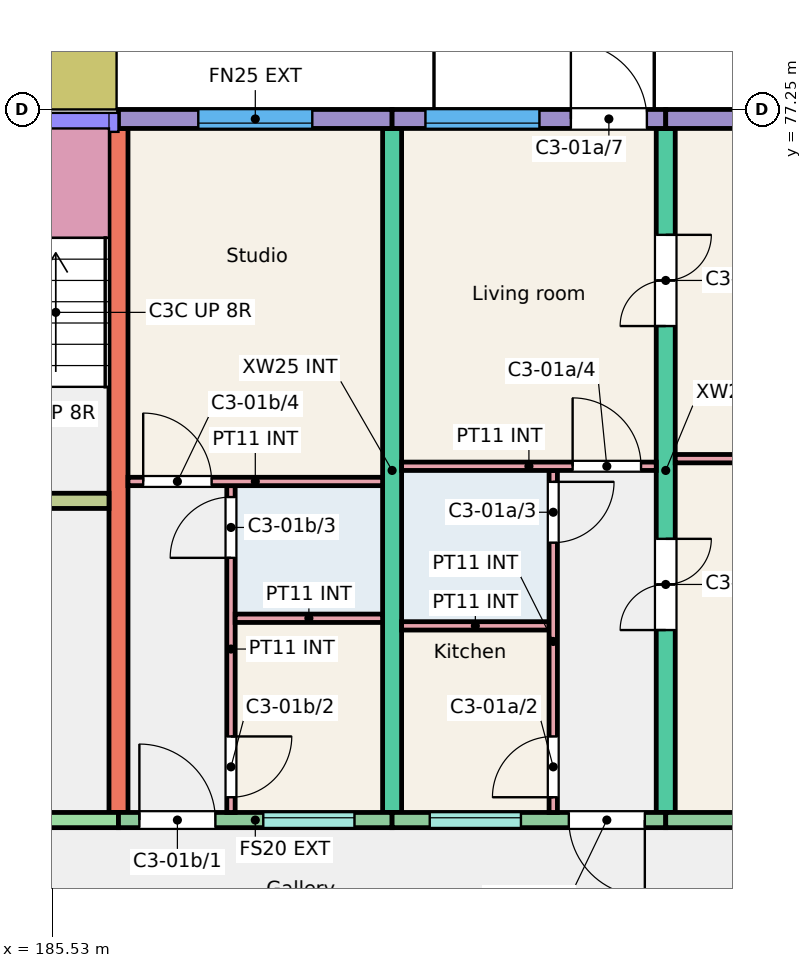
"""IFC4 building model, lengths in metres.
Left out: names, types, materials, properties, quantities, classifications, styles, units other than length and angle.
Written with IfcOpenShell. Run it as: python <this file> out.ifc"""

import sys

from ifc_helpers import new_model, si_unit, direction, frame, frame_2d, origin, place, context, subcontext, project, spatial, rectangle, extrude, element, fill, save


model = new_model("IFC4")
c1 = context("Model", 3, precision=1e-05, world=origin(), true_north=direction((0.0, 1.0)))
c2 = subcontext(c1, "Body", "Model", "MODEL_VIEW")
j1 = project(units=[si_unit("LENGTHUNIT", "METRE"), si_unit("PLANEANGLEUNIT", "RADIAN")], contexts=[c1])
p1 = place(None, origin())
s1 = spatial("IfcSite", under=j1, at=p1, CompositionType="ELEMENT")
p2 = place(p1, origin())
s2 = spatial("IfcBuilding", under=s1, at=p2, CompositionType="ELEMENT")
p3 = place(p2, frame((0.0, 0.0, 3.0)))
s3 = spatial("IfcBuildingStorey", under=s2, at=p3, CompositionType="ELEMENT", Elevation=3.0)
for number, where, z_axis, x_axis in (
    (1, (186.4, 68.0, 0.0), (0.0, 0.0, 1.0), (0.0, 1.0, 0.0)),
    (2, (190.0, 68.0, 0.0), (0.0, 0.0, 1.0), (0.0, 1.0, 0.0)),
):
    element("IfcWall", number, at=place(p3, frame(where, z_axis=z_axis, x_axis=x_axis)), inside=s3, PredefinedType="SHEAR", context=c2, shape_type="SweptSolid", body=[
        extrude(rectangle(XDim=9.0, YDim=0.25, at=frame_2d((4.5, 0.0))), origin(), (0.0, 0.0, 1.0), 3.0),
    ])
p4 = place(p3, frame((193.6, 68.0, 0.0), z_axis=(0.0, 0.0, 1.0), x_axis=(0.0, 1.0, 0.0)))
e3 = element("IfcWall", 3, at=p4, inside=s3, PredefinedType="SHEAR", context=c2, shape_type="SweptSolid", body=[
    extrude(rectangle(XDim=9.0, YDim=0.25, at=frame_2d((4.5, 0.0))), origin(), (0.0, 0.0, 1.0), 3.0),
])
p5 = place(p4, frame((2.4, 0.0, 0.0)))
e4 = element("IfcOpeningElement", 4, at=p5, cuts=e3, PredefinedType="OPENING", context=c2, shape_type="SweptSolid", body=[
    extrude(rectangle(XDim=1.2, YDim=2.1, at=frame_2d((0.6, 1.05))), frame((0.0, 0.135, 0.0), z_axis=(0.0, -1.0, 0.0), x_axis=(1.0, 0.0, 0.0)), (0.0, 0.0, 1.0), 0.27),
])
p6 = place(p4, frame((6.4, 0.0, 0.0)))
e5 = element("IfcOpeningElement", 5, at=p6, cuts=e3, PredefinedType="OPENING", context=c2, shape_type="SweptSolid", body=[
    extrude(rectangle(XDim=1.2, YDim=2.1, at=frame_2d((0.6, 1.05))), frame((0.0, 0.135, 0.0), z_axis=(0.0, -1.0, 0.0), x_axis=(1.0, 0.0, 0.0)), (0.0, 0.0, 1.0), 0.27),
])
p7 = place(p3, frame((180.55, 67.9, 0.0), z_axis=(0.0, 0.0, 1.0), x_axis=(1.0, 0.0, 0.0)))
e6 = element("IfcWall", 6, at=p7, inside=s3, PredefinedType="SHEAR", context=c2, shape_type="SweptSolid", body=[
    extrude(rectangle(XDim=5.85, YDim=0.2, at=frame_2d((2.925, 0.0))), origin(), (0.0, 0.0, 1.0), 3.0),
])
p8 = place(p7, frame((2.312, 0.0, 0.0)))
e7 = element("IfcOpeningElement", 7, at=p8, cuts=e6, PredefinedType="OPENING", context=c2, shape_type="SweptSolid", body=[
    extrude(rectangle(XDim=1.1, YDim=2.1, at=frame_2d((0.55, 1.05))), frame((0.0, 0.11, 0.0), z_axis=(0.0, -1.0, 0.0), x_axis=(1.0, 0.0, 0.0)), (0.0, 0.0, 1.0), 0.22),
])
p9 = place(p3, frame((180.55, 72.1, 0.0), z_axis=(0.0, 0.0, 1.0), x_axis=(1.0, 0.0, 0.0)))
e8 = element("IfcWall", 8, at=p9, inside=s3, PredefinedType="SHEAR", context=c2, shape_type="SweptSolid", body=[
    extrude(rectangle(XDim=5.725, YDim=0.2, at=frame_2d((2.862, 0.0))), origin(), (0.0, 0.0, 1.0), 3.0),
])
p10 = place(p9, frame((3.775, 0.0, 0.0)))
e9 = element("IfcOpeningElement", 9, at=p10, cuts=e8, PredefinedType="OPENING", context=c2, shape_type="SweptSolid", body=[
    extrude(rectangle(XDim=1.0, YDim=2.1, at=frame_2d((0.5, 1.05))), frame((0.0, 0.11, 0.0), z_axis=(0.0, -1.0, 0.0), x_axis=(1.0, 0.0, 0.0)), (0.0, 0.0, 1.0), 0.22),
])
p11 = place(p9, frame((0.762, 0.0, 0.0)))
e10 = element("IfcOpeningElement", 10, at=p11, cuts=e8, PredefinedType="OPENING", context=c2, shape_type="SweptSolid", body=[
    extrude(rectangle(XDim=1.1, YDim=2.1, at=frame_2d((0.55, 1.05))), frame((0.0, 0.11, 0.0), z_axis=(0.0, -1.0, 0.0), x_axis=(1.0, 0.0, 0.0)), (0.0, 0.0, 1.0), 0.22),
])
p12 = place(p3, frame((186.4, 77.125, 0.0), z_axis=(0.0, 0.0, 1.0), x_axis=(1.0, 0.0, 0.0)))
e11 = element("IfcWall", 11, at=p12, inside=s3, PredefinedType="SOLIDWALL", context=c2, shape_type="SweptSolid", body=[
    extrude(rectangle(XDim=3.6, YDim=0.25, at=frame_2d((1.8, 0.0))), origin(), (0.0, 0.0, 1.0), 3.0),
])
p13 = place(p12, frame((1.05, 0.0, 0.9)))
e12 = element("IfcOpeningElement", 12, at=p13, cuts=e11, PredefinedType="OPENING", context=c2, shape_type="SweptSolid", body=[
    extrude(rectangle(XDim=1.5, YDim=1.5, at=frame_2d((0.75, 0.75))), frame((0.0, 0.135, 0.0), z_axis=(0.0, -1.0, 0.0), x_axis=(1.0, 0.0, 0.0)), (0.0, 0.0, 1.0), 0.27),
])
p14 = place(p3, frame((186.4, 67.9, 0.0), z_axis=(0.0, 0.0, 1.0), x_axis=(1.0, 0.0, 0.0)))
e13 = element("IfcWall", 13, at=p14, inside=s3, PredefinedType="SOLIDWALL", context=c2, shape_type="SweptSolid", body=[
    extrude(rectangle(XDim=3.6, YDim=0.2, at=frame_2d((1.8, 0.0))), origin(), (0.0, 0.0, 1.0), 3.0),
])
p15 = place(p14, frame((1.905, 0.0, 1.1)))
e14 = element("IfcOpeningElement", 14, at=p15, cuts=e13, PredefinedType="OPENING", context=c2, shape_type="SweptSolid", body=[
    extrude(rectangle(XDim=1.2, YDim=1.3, at=frame_2d((0.6, 0.65))), frame((0.0, 0.11, 0.0), z_axis=(0.0, -1.0, 0.0), x_axis=(1.0, 0.0, 0.0)), (0.0, 0.0, 1.0), 0.22),
])
p16 = place(p14, frame((0.275, 0.0, 0.0)))
e15 = element("IfcOpeningElement", 15, at=p16, cuts=e13, PredefinedType="OPENING", context=c2, shape_type="SweptSolid", body=[
    extrude(rectangle(XDim=1.0, YDim=2.1, at=frame_2d((0.5, 1.05))), frame((0.0, 0.11, 0.0), z_axis=(0.0, -1.0, 0.0), x_axis=(1.0, 0.0, 0.0)), (0.0, 0.0, 1.0), 0.22),
])
p17 = place(p3, frame((190.0, 77.125, 0.0), z_axis=(0.0, 0.0, 1.0), x_axis=(1.0, 0.0, 0.0)))
e16 = element("IfcWall", 16, at=p17, inside=s3, PredefinedType="SOLIDWALL", context=c2, shape_type="SweptSolid", body=[
    extrude(rectangle(XDim=3.6, YDim=0.25, at=frame_2d((1.8, 0.0))), origin(), (0.0, 0.0, 1.0), 3.0),
])
p18 = place(p17, frame((0.438, 0.0, 0.9)))
e17 = element("IfcOpeningElement", 17, at=p18, cuts=e16, PredefinedType="OPENING", context=c2, shape_type="SweptSolid", body=[
    extrude(rectangle(XDim=1.5, YDim=1.5, at=frame_2d((0.75, 0.75))), frame((0.0, 0.135, 0.0), z_axis=(0.0, -1.0, 0.0), x_axis=(1.0, 0.0, 0.0)), (0.0, 0.0, 1.0), 0.27),
])
p19 = place(p17, frame((2.352, 0.0, 0.0)))
e18 = element("IfcOpeningElement", 18, at=p19, cuts=e16, PredefinedType="OPENING", context=c2, shape_type="SweptSolid", body=[
    extrude(rectangle(XDim=1.0, YDim=2.1, at=frame_2d((0.5, 1.05))), frame((0.0, 0.135, 0.0), z_axis=(0.0, -1.0, 0.0), x_axis=(1.0, 0.0, 0.0)), (0.0, 0.0, 1.0), 0.27),
])
p20 = place(p3, frame((190.0, 67.9, 0.0), z_axis=(0.0, 0.0, 1.0), x_axis=(1.0, 0.0, 0.0)))
e19 = element("IfcWall", 19, at=p20, inside=s3, PredefinedType="SOLIDWALL", context=c2, shape_type="SweptSolid", body=[
    extrude(rectangle(XDim=3.6, YDim=0.2, at=frame_2d((1.8, 0.0))), origin(), (0.0, 0.0, 1.0), 3.0),
])
p21 = place(p20, frame((0.495, 0.0, 1.1)))
e20 = element("IfcOpeningElement", 20, at=p21, cuts=e19, PredefinedType="OPENING", context=c2, shape_type="SweptSolid", body=[
    extrude(rectangle(XDim=1.2, YDim=1.3, at=frame_2d((0.6, 0.65))), frame((0.0, 0.11, 0.0), z_axis=(0.0, -1.0, 0.0), x_axis=(1.0, 0.0, 0.0)), (0.0, 0.0, 1.0), 0.22),
])
p22 = place(p20, frame((2.325, 0.0, 0.0)))
e21 = element("IfcOpeningElement", 21, at=p22, cuts=e19, PredefinedType="OPENING", context=c2, shape_type="SweptSolid", body=[
    extrude(rectangle(XDim=1.0, YDim=2.1, at=frame_2d((0.5, 1.05))), frame((0.0, 0.11, 0.0), z_axis=(0.0, -1.0, 0.0), x_axis=(1.0, 0.0, 0.0)), (0.0, 0.0, 1.0), 0.22),
])
p23 = place(p3, frame((193.6, 77.125, 0.0), z_axis=(0.0, 0.0, 1.0), x_axis=(1.0, 0.0, 0.0)))
e22 = element("IfcWall", 22, at=p23, inside=s3, PredefinedType="SOLIDWALL", context=c2, shape_type="SweptSolid", body=[
    extrude(rectangle(XDim=3.6, YDim=0.25, at=frame_2d((1.8, 0.0))), origin(), (0.0, 0.0, 1.0), 3.0),
])
p24 = place(p23, frame((1.038, 0.0, 0.9)))
e23 = element("IfcOpeningElement", 23, at=p24, cuts=e22, PredefinedType="OPENING", context=c2, shape_type="SweptSolid", body=[
    extrude(rectangle(XDim=1.5, YDim=1.5, at=frame_2d((0.75, 0.75))), frame((0.0, 0.135, 0.0), z_axis=(0.0, -1.0, 0.0), x_axis=(1.0, 0.0, 0.0)), (0.0, 0.0, 1.0), 0.27),
])
p25 = place(p3, frame((193.6, 67.9, 0.0), z_axis=(0.0, 0.0, 1.0), x_axis=(1.0, 0.0, 0.0)))
e24 = element("IfcWall", 24, at=p25, inside=s3, PredefinedType="SOLIDWALL", context=c2, shape_type="SweptSolid", body=[
    extrude(rectangle(XDim=3.45, YDim=0.2, at=frame_2d((1.725, 0.0))), origin(), (0.0, 0.0, 1.0), 3.0),
])
p26 = place(p25, frame((1.038, 0.0, 0.9)))
e25 = element("IfcOpeningElement", 25, at=p26, cuts=e24, PredefinedType="OPENING", context=c2, shape_type="SweptSolid", body=[
    extrude(rectangle(XDim=1.5, YDim=1.5, at=frame_2d((0.75, 0.75))), frame((0.0, 0.11, 0.0), z_axis=(0.0, -1.0, 0.0), x_axis=(1.0, 0.0, 0.0)), (0.0, 0.0, 1.0), 0.22),
])
p27 = place(p3, frame((190.125, 70.455, 0.0), z_axis=(0.0, 0.0, 1.0), x_axis=(1.0, 0.0, 0.0)))
e26 = element("IfcWall", 26, at=p27, inside=s3, PredefinedType="PARTITIONING", context=c2, shape_type="SweptSolid", body=[
    extrude(rectangle(XDim=1.94, YDim=0.11, at=frame_2d((0.97, 0.0))), origin(), (0.0, 0.0, 1.0), 2.8),
])
p28 = place(p3, frame((192.12, 68.0, 0.0), z_axis=(0.0, 0.0, 1.0), x_axis=(0.0, 1.0, 0.0)))
e27 = element("IfcWall", 27, at=p28, inside=s3, PredefinedType="PARTITIONING", context=c2, shape_type="SweptSolid", body=[
    extrude(rectangle(XDim=4.5, YDim=0.11, at=frame_2d((2.25, 0.0))), origin(), (0.0, 0.0, 1.0), 2.8),
])
p29 = place(p28, frame((0.2, 0.0, 0.0)))
e28 = element("IfcOpeningElement", 28, at=p29, cuts=e27, PredefinedType="OPENING", context=c2, shape_type="SweptSolid", body=[
    extrude(rectangle(XDim=0.8, YDim=2.1, at=frame_2d((0.4, 1.05))), frame((0.0, 0.065, 0.0), z_axis=(0.0, -1.0, 0.0), x_axis=(1.0, 0.0, 0.0)), (0.0, 0.0, 1.0), 0.13),
])
p30 = place(p28, frame((3.55, 0.0, 0.0)))
e29 = element("IfcOpeningElement", 29, at=p30, cuts=e27, PredefinedType="OPENING", context=c2, shape_type="SweptSolid", body=[
    extrude(rectangle(XDim=0.8, YDim=2.1, at=frame_2d((0.4, 1.05))), frame((0.0, 0.065, 0.0), z_axis=(0.0, -1.0, 0.0), x_axis=(1.0, 0.0, 0.0)), (0.0, 0.0, 1.0), 0.13),
])
p31 = place(p3, frame((190.125, 72.555, 0.0), z_axis=(0.0, 0.0, 1.0), x_axis=(1.0, 0.0, 0.0)))
e30 = element("IfcWall", 30, at=p31, inside=s3, PredefinedType="PARTITIONING", context=c2, shape_type="SweptSolid", body=[
    extrude(rectangle(XDim=3.35, YDim=0.11, at=frame_2d((1.675, 0.0))), origin(), (0.0, 0.0, 1.0), 2.8),
])
p32 = place(p31, frame((2.25, 0.0, 0.0)))
e31 = element("IfcOpeningElement", 31, at=p32, cuts=e30, PredefinedType="OPENING", context=c2, shape_type="SweptSolid", body=[
    extrude(rectangle(XDim=0.9, YDim=2.1, at=frame_2d((0.45, 1.05))), frame((0.0, 0.065, 0.0), z_axis=(0.0, -1.0, 0.0), x_axis=(1.0, 0.0, 0.0)), (0.0, 0.0, 1.0), 0.13),
])
p33 = place(p3, frame((193.725, 72.655, 0.0), z_axis=(0.0, 0.0, 1.0), x_axis=(1.0, 0.0, 0.0)))
e32 = element("IfcWall", 32, at=p33, inside=s3, PredefinedType="PARTITIONING", context=c2, shape_type="SweptSolid", body=[
    extrude(rectangle(XDim=3.325, YDim=0.11, at=frame_2d((1.663, 0.0))), origin(), (0.0, 0.0, 1.0), 2.8),
])
p34 = place(p3, frame((187.88, 68.0, 0.0), z_axis=(0.0, 0.0, 1.0), x_axis=(0.0, 1.0, 0.0)))
e33 = element("IfcWall", 33, at=p34, inside=s3, PredefinedType="PARTITIONING", context=c2, shape_type="SweptSolid", body=[
    extrude(rectangle(XDim=4.3, YDim=0.11, at=frame_2d((2.15, 0.0))), origin(), (0.0, 0.0, 1.0), 2.8),
])
p35 = place(p34, frame((0.2, 0.0, 0.0)))
e34 = element("IfcOpeningElement", 34, at=p35, cuts=e33, PredefinedType="OPENING", context=c2, shape_type="SweptSolid", body=[
    extrude(rectangle(XDim=0.8, YDim=2.1, at=frame_2d((0.4, 1.05))), frame((0.0, 0.065, 0.0), z_axis=(0.0, -1.0, 0.0), x_axis=(1.0, 0.0, 0.0)), (0.0, 0.0, 1.0), 0.13),
])
p36 = place(p34, frame((3.35, 0.0, 0.0)))
e35 = element("IfcOpeningElement", 35, at=p36, cuts=e33, PredefinedType="OPENING", context=c2, shape_type="SweptSolid", body=[
    extrude(rectangle(XDim=0.8, YDim=2.1, at=frame_2d((0.4, 1.05))), frame((0.0, 0.065, 0.0), z_axis=(0.0, -1.0, 0.0), x_axis=(1.0, 0.0, 0.0)), (0.0, 0.0, 1.0), 0.13),
])
p37 = place(p3, frame((187.935, 70.555, 0.0), z_axis=(0.0, 0.0, 1.0), x_axis=(1.0, 0.0, 0.0)))
e36 = element("IfcWall", 36, at=p37, inside=s3, PredefinedType="PARTITIONING", context=c2, shape_type="SweptSolid", body=[
    extrude(rectangle(XDim=1.94, YDim=0.11, at=frame_2d((0.97, 0.0))), origin(), (0.0, 0.0, 1.0), 2.8),
])
p38 = place(p3, frame((186.525, 72.355, 0.0), z_axis=(0.0, 0.0, 1.0), x_axis=(1.0, 0.0, 0.0)))
e37 = element("IfcWall", 37, at=p38, inside=s3, PredefinedType="PARTITIONING", context=c2, shape_type="SweptSolid", body=[
    extrude(rectangle(XDim=3.35, YDim=0.11, at=frame_2d((1.675, 0.0))), origin(), (0.0, 0.0, 1.0), 2.8),
])
p39 = place(p38, frame((0.2, 0.0, 0.0)))
e38 = element("IfcOpeningElement", 38, at=p39, cuts=e37, PredefinedType="OPENING", context=c2, shape_type="SweptSolid", body=[
    extrude(rectangle(XDim=0.9, YDim=2.1, at=frame_2d((0.45, 1.05))), frame((0.0, 0.065, 0.0), z_axis=(0.0, -1.0, 0.0), x_axis=(1.0, 0.0, 0.0)), (0.0, 0.0, 1.0), 0.13),
])
p40 = place(p21, origin())
e39 = element("IfcWindow", 39, at=p40, inside=s3, PartitioningType="SINGLE_PANEL", PredefinedType="WINDOW", context=c2, shape_type="SweptSolid", body=[
    extrude(rectangle(XDim=1.2, YDim=1.3, at=frame_2d((0.6, 0.65))), frame((0.0, 0.06, 0.0), z_axis=(0.0, -1.0, 0.0), x_axis=(1.0, 0.0, 0.0)), (0.0, 0.0, 1.0), 0.06),
])
fill(e20, e39)
p41 = place(p18, origin())
e40 = element("IfcWindow", 40, at=p41, inside=s3, PartitioningType="SINGLE_PANEL", PredefinedType="WINDOW", context=c2, shape_type="SweptSolid", body=[
    extrude(rectangle(XDim=1.5, YDim=1.5, at=frame_2d((0.75, 0.75))), frame((0.0, -0.025, 0.0), z_axis=(0.0, -1.0, 0.0), x_axis=(1.0, 0.0, 0.0)), (0.0, 0.0, 1.0), 0.06),
])
fill(e17, e40)
p42 = place(p15, origin())
e41 = element("IfcWindow", 41, at=p42, inside=s3, PartitioningType="SINGLE_PANEL", PredefinedType="WINDOW", context=c2, shape_type="SweptSolid", body=[
    extrude(rectangle(XDim=1.2, YDim=1.3, at=frame_2d((0.6, 0.65))), frame((0.0, 0.06, 0.0), z_axis=(0.0, -1.0, 0.0), x_axis=(1.0, 0.0, 0.0)), (0.0, 0.0, 1.0), 0.06),
])
fill(e14, e41)
p43 = place(p13, origin())
e42 = element("IfcWindow", 42, at=p43, inside=s3, PartitioningType="SINGLE_PANEL", PredefinedType="WINDOW", context=c2, shape_type="SweptSolid", body=[
    extrude(rectangle(XDim=1.5, YDim=1.5, at=frame_2d((0.75, 0.75))), frame((0.0, -0.025, 0.0), z_axis=(0.0, -1.0, 0.0), x_axis=(1.0, 0.0, 0.0)), (0.0, 0.0, 1.0), 0.06),
])
fill(e12, e42)
p44 = place(p22, origin())
e43 = element("IfcDoor", 43, at=p44, inside=s3, OperationType="SINGLE_SWING_RIGHT", PredefinedType="DOOR", context=c2, shape_type="SweptSolid", body=[
    extrude(rectangle(XDim=1.0, YDim=2.1, at=frame_2d((0.5, 1.05))), frame((0.0, 0.025, 0.0), z_axis=(0.0, -1.0, 0.0), x_axis=(1.0, 0.0, 0.0)), (0.0, 0.0, 1.0), 0.05),
])
fill(e21, e43)
p45 = place(p29, origin())
e44 = element("IfcDoor", 44, at=p45, inside=s3, OperationType="SINGLE_SWING_LEFT", PredefinedType="DOOR", context=c2, shape_type="SweptSolid", body=[
    extrude(rectangle(XDim=0.8, YDim=2.1, at=frame_2d((0.4, 1.05))), frame((0.0, 0.025, 0.0), z_axis=(0.0, -1.0, 0.0), x_axis=(1.0, 0.0, 0.0)), (0.0, 0.0, 1.0), 0.05),
])
fill(e28, e44)
p46 = place(p30, origin())
e45 = element("IfcDoor", 45, at=p46, inside=s3, OperationType="SINGLE_SWING_RIGHT", PredefinedType="DOOR", context=c2, shape_type="SweptSolid", body=[
    extrude(rectangle(XDim=0.8, YDim=2.1, at=frame_2d((0.4, 1.05))), frame((0.0, 0.025, 0.0), z_axis=(0.0, -1.0, 0.0), x_axis=(1.0, 0.0, 0.0)), (0.0, 0.0, 1.0), 0.05),
])
fill(e29, e45)
p47 = place(p32, origin())
e46 = element("IfcDoor", 46, at=p47, inside=s3, OperationType="SINGLE_SWING_LEFT", PredefinedType="DOOR", context=c2, shape_type="SweptSolid", body=[
    extrude(rectangle(XDim=0.9, YDim=2.1, at=frame_2d((0.45, 1.05))), frame((0.0, 0.025, 0.0), z_axis=(0.0, -1.0, 0.0), x_axis=(1.0, 0.0, 0.0)), (0.0, 0.0, 1.0), 0.05),
])
fill(e31, e46)
p48 = place(p5, origin())
e47 = element("IfcDoor", 47, at=p48, inside=s3, OperationType="DOUBLE_DOOR_SINGLE_SWING", PredefinedType="DOOR", context=c2, shape_type="SweptSolid", body=[
    extrude(rectangle(XDim=1.2, YDim=2.1, at=frame_2d((0.6, 1.05))), frame((0.0, 0.025, 0.0), z_axis=(0.0, -1.0, 0.0), x_axis=(1.0, 0.0, 0.0)), (0.0, 0.0, 1.0), 0.05),
])
fill(e4, e47)
p49 = place(p6, origin())
e48 = element("IfcDoor", 48, at=p49, inside=s3, OperationType="DOUBLE_DOOR_SINGLE_SWING", PredefinedType="DOOR", context=c2, shape_type="SweptSolid", body=[
    extrude(rectangle(XDim=1.2, YDim=2.1, at=frame_2d((0.6, 1.05))), frame((0.0, 0.025, 0.0), z_axis=(0.0, -1.0, 0.0), x_axis=(1.0, 0.0, 0.0)), (0.0, 0.0, 1.0), 0.05),
])
fill(e5, e48)
p50 = place(p19, origin())
e49 = element("IfcDoor", 49, at=p50, inside=s3, OperationType="SINGLE_SWING_LEFT", PredefinedType="DOOR", context=c2, shape_type="SweptSolid", body=[
    extrude(rectangle(XDim=1.0, YDim=2.1, at=frame_2d((0.5, 1.05))), frame((0.0, 0.025, 0.0), z_axis=(0.0, -1.0, 0.0), x_axis=(1.0, 0.0, 0.0)), (0.0, 0.0, 1.0), 0.05),
])
fill(e18, e49)
p51 = place(p16, origin())
e50 = element("IfcDoor", 50, at=p51, inside=s3, OperationType="SINGLE_SWING_LEFT", PredefinedType="DOOR", context=c2, shape_type="SweptSolid", body=[
    extrude(rectangle(XDim=1.0, YDim=2.1, at=frame_2d((0.5, 1.05))), frame((0.0, 0.025, 0.0), z_axis=(0.0, -1.0, 0.0), x_axis=(1.0, 0.0, 0.0)), (0.0, 0.0, 1.0), 0.05),
])
fill(e15, e50)
p52 = place(p35, origin())
e51 = element("IfcDoor", 51, at=p52, inside=s3, OperationType="SINGLE_SWING_RIGHT", PredefinedType="DOOR", context=c2, shape_type="SweptSolid", body=[
    extrude(rectangle(XDim=0.8, YDim=2.1, at=frame_2d((0.4, 1.05))), frame((0.0, 0.025, 0.0), z_axis=(0.0, -1.0, 0.0), x_axis=(1.0, 0.0, 0.0)), (0.0, 0.0, 1.0), 0.05),
])
fill(e34, e51)
p53 = place(p36, origin())
e52 = element("IfcDoor", 52, at=p53, inside=s3, OperationType="SINGLE_SWING_LEFT", PredefinedType="DOOR", context=c2, shape_type="SweptSolid", body=[
    extrude(rectangle(XDim=0.8, YDim=2.1, at=frame_2d((0.4, 1.05))), frame((0.0, 0.025, 0.0), z_axis=(0.0, -1.0, 0.0), x_axis=(1.0, 0.0, 0.0)), (0.0, 0.0, 1.0), 0.05),
])
fill(e35, e52)
p54 = place(p39, origin())
e53 = element("IfcDoor", 53, at=p54, inside=s3, OperationType="SINGLE_SWING_LEFT", PredefinedType="DOOR", context=c2, shape_type="SweptSolid", body=[
    extrude(rectangle(XDim=0.9, YDim=2.1, at=frame_2d((0.45, 1.05))), frame((0.0, 0.025, 0.0), z_axis=(0.0, -1.0, 0.0), x_axis=(1.0, 0.0, 0.0)), (0.0, 0.0, 1.0), 0.05),
])
fill(e38, e53)
save(model, sys.argv[1])
